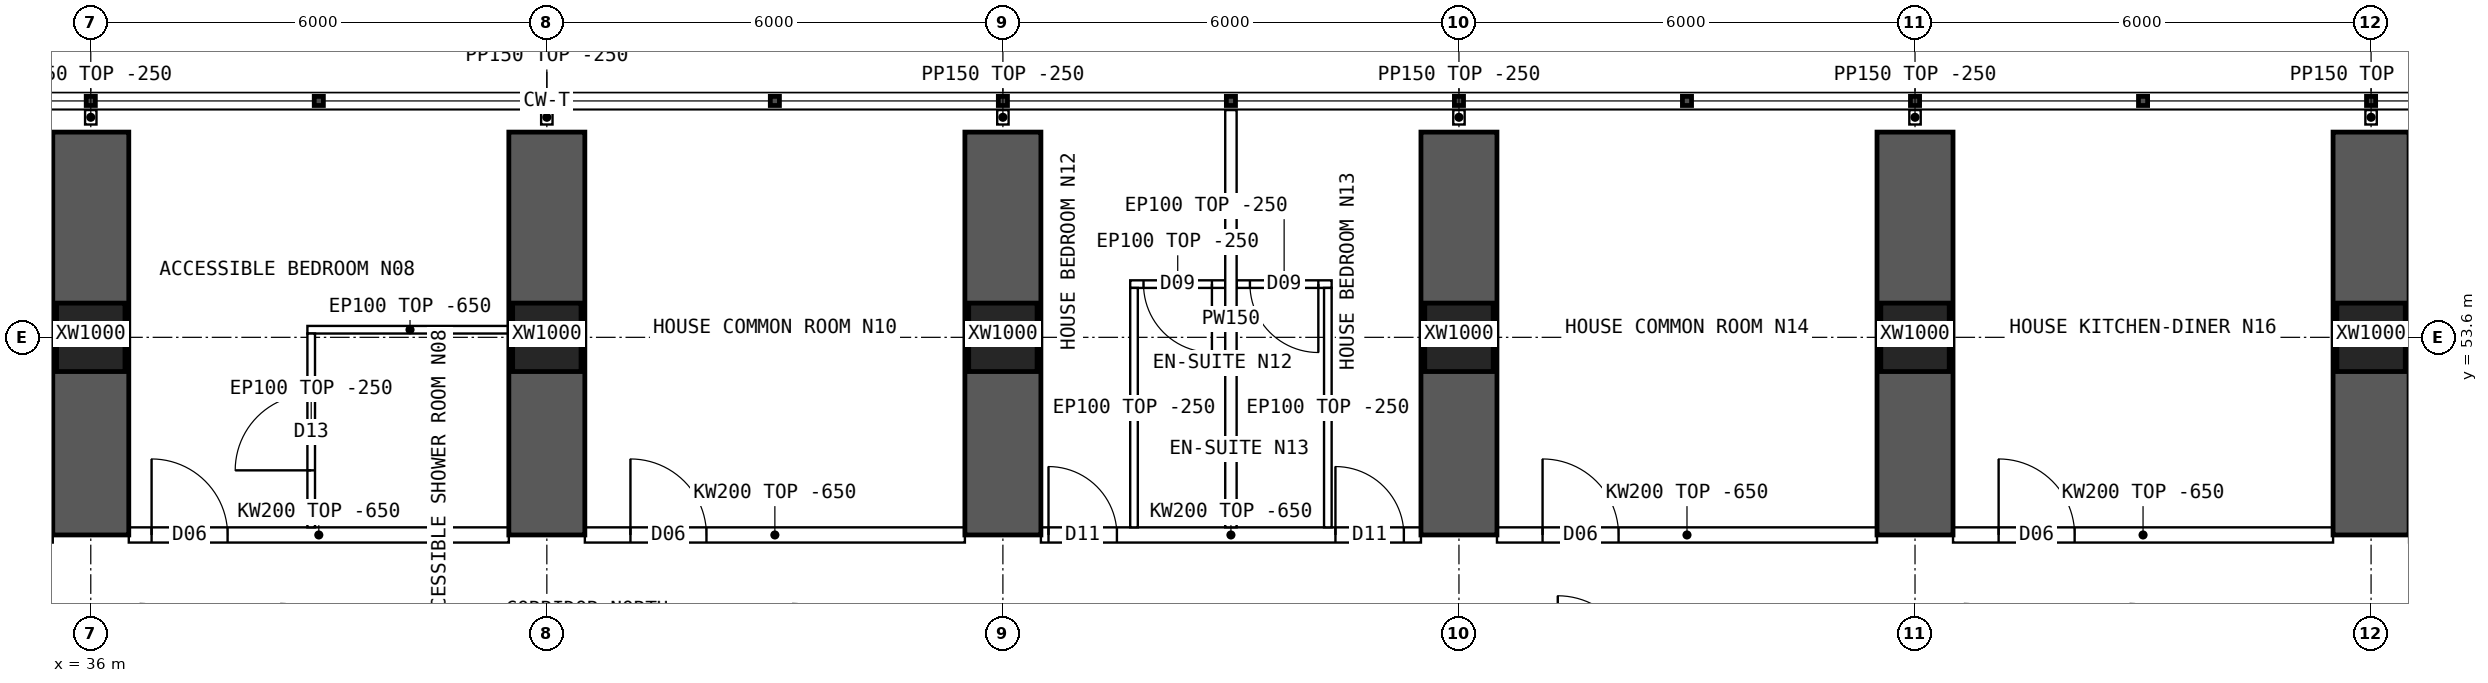
"""IFC4 building model, lengths in metres.
Left out: names, types, materials, properties, quantities, classifications, styles, units other than length and angle.
Written with IfcOpenShell. Run it as: python <this file> out.ifc"""

import sys

from ifc_helpers import new_model, si_unit, direction, frame, frame_2d, origin, origin_2d, place, context, subcontext, project, spatial, polyline, rectangle, hollow_rectangle, outline, extrude, element, fill, save


model = new_model("IFC4")
c1 = context("Model", 3, precision=1e-05, world=origin(), true_north=direction((0.0, 1.0)))
c2 = subcontext(c1, "Body", "Model", "MODEL_VIEW")
j1 = project(units=[si_unit("LENGTHUNIT", "METRE"), si_unit("PLANEANGLEUNIT", "RADIAN")], contexts=[c1])
p1 = place(None, origin())
s1 = spatial("IfcSite", under=j1, at=p1, CompositionType="ELEMENT")
p2 = place(p1, origin())
s2 = spatial("IfcBuilding", under=s1, at=p2, CompositionType="ELEMENT")
p3 = place(p2, frame((0.0, 0.0, 57.7)))
s3 = spatial("IfcBuildingStorey", under=s2, at=p3, CompositionType="ELEMENT", Elevation=57.7)
for number, where, z_axis, x_axis in (
    (1, (36.0, 53.6, 0.0), (0.0, 0.0, 1.0), (1.0, 0.0, 0.0)),
    (2, (42.0, 53.6, 0.0), (0.0, 0.0, 1.0), (1.0, 0.0, 0.0)),
    (3, (48.0, 53.6, 0.0), (0.0, 0.0, 1.0), (1.0, 0.0, 0.0)),
    (4, (54.0, 53.6, 0.0), (0.0, 0.0, 1.0), (1.0, 0.0, 0.0)),
    (5, (60.0, 53.6, 0.0), (0.0, 0.0, 1.0), (1.0, 0.0, 0.0)),
    (6, (66.0, 53.6, 0.0), (0.0, 0.0, 1.0), (1.0, 0.0, 0.0)),
):
    element("IfcColumn", number, at=place(p3, frame(where, z_axis=z_axis, x_axis=x_axis)), inside=s3, PredefinedType="COLUMN", context=c2, shape_type="SweptSolid", body=[
        extrude(hollow_rectangle(XDim=0.9, YDim=0.9, WallThickness=0.09, at=origin_2d()), origin(), (0.0, 0.0, 1.0), 3.75),
    ])
for number, where, z_axis, x_axis in (
    (7, (36.0, 51.0, 0.0), (0.0, 0.0, 1.0), (0.0, 1.0, 0.0)),
    (8, (42.0, 51.0, 0.0), (0.0, 0.0, 1.0), (0.0, 1.0, 0.0)),
    (9, (48.0, 51.0, 0.0), (0.0, 0.0, 1.0), (0.0, 1.0, 0.0)),
    (10, (54.0, 51.0, 0.0), (0.0, 0.0, 1.0), (0.0, 1.0, 0.0)),
    (11, (60.0, 51.0, 0.0), (0.0, 0.0, 1.0), (0.0, 1.0, 0.0)),
    (12, (66.0, 51.0, 0.0), (0.0, 0.0, 1.0), (0.0, 1.0, 0.0)),
):
    element("IfcWall", number, at=place(p3, frame(where, z_axis=z_axis, x_axis=x_axis)), inside=s3, PredefinedType="SHEAR", context=c2, shape_type="SweptSolid", body=[
        extrude(rectangle(XDim=5.3, YDim=1.0, at=frame_2d((2.65, 0.0))), origin(), (0.0, 0.0, 1.0), 3.75),
    ])
p4 = place(p3, frame((36.5, 51.0, 0.0), z_axis=(0.0, 0.0, 1.0), x_axis=(1.0, 0.0, 0.0)))
e13 = element("IfcWall", 13, at=p4, inside=s3, PredefinedType="SOLIDWALL", context=c2, shape_type="SweptSolid", body=[
    extrude(outline(polyline([(0.0, 0.0), (5.0, 0.0), (5.0, 3.1), (0.0, 3.1), (0.0, 0.0)])), frame((0.0, 0.1, 0.0), z_axis=(0.0, -1.0, 0.0), x_axis=(1.0, 0.0, 0.0)), (0.0, 0.0, 1.0), 0.2),
])
p5 = place(p4, frame((0.3, 0.0, 0.0)))
e14 = element("IfcOpeningElement", 14, at=p5, cuts=e13, PredefinedType="OPENING", context=c2, shape_type="SweptSolid", body=[
    extrude(rectangle(XDim=1.0, YDim=2.1, at=frame_2d((0.5, 1.05))), frame((0.0, 0.11, 0.0), z_axis=(0.0, -1.0, 0.0), x_axis=(1.0, 0.0, 0.0)), (0.0, 0.0, 1.0), 0.22),
])
p6 = place(p3, frame((42.5, 51.0, 0.0), z_axis=(0.0, 0.0, 1.0), x_axis=(1.0, 0.0, 0.0)))
e15 = element("IfcWall", 15, at=p6, inside=s3, PredefinedType="SOLIDWALL", context=c2, shape_type="SweptSolid", body=[
    extrude(outline(polyline([(0.0, 0.0), (5.0, 0.0), (5.0, 3.1), (0.0, 3.1), (0.0, 0.0)])), frame((0.0, 0.1, 0.0), z_axis=(0.0, -1.0, 0.0), x_axis=(1.0, 0.0, 0.0)), (0.0, 0.0, 1.0), 0.2),
])
p7 = place(p6, frame((0.6, 0.0, 0.0)))
e16 = element("IfcOpeningElement", 16, at=p7, cuts=e15, PredefinedType="OPENING", context=c2, shape_type="SweptSolid", body=[
    extrude(rectangle(XDim=1.0, YDim=2.1, at=frame_2d((0.5, 1.05))), frame((0.0, 0.11, 0.0), z_axis=(0.0, -1.0, 0.0), x_axis=(1.0, 0.0, 0.0)), (0.0, 0.0, 1.0), 0.22),
])
p8 = place(p3, frame((48.5, 51.0, 0.0), z_axis=(0.0, 0.0, 1.0), x_axis=(1.0, 0.0, 0.0)))
e17 = element("IfcWall", 17, at=p8, inside=s3, PredefinedType="SOLIDWALL", context=c2, shape_type="SweptSolid", body=[
    extrude(outline(polyline([(0.0, 0.0), (5.0, 0.0), (5.0, 3.1), (0.0, 3.1), (0.0, 0.0)])), frame((0.0, 0.1, 0.0), z_axis=(0.0, -1.0, 0.0), x_axis=(1.0, 0.0, 0.0)), (0.0, 0.0, 1.0), 0.2),
])
p9 = place(p8, frame((0.1, 0.0, 0.0)))
e18 = element("IfcOpeningElement", 18, at=p9, cuts=e17, PredefinedType="OPENING", context=c2, shape_type="SweptSolid", body=[
    extrude(rectangle(XDim=0.9, YDim=2.1, at=frame_2d((0.45, 1.05))), frame((0.0, 0.11, 0.0), z_axis=(0.0, -1.0, 0.0), x_axis=(1.0, 0.0, 0.0)), (0.0, 0.0, 1.0), 0.22),
])
p10 = place(p8, frame((3.875, 0.0, 0.0)))
e19 = element("IfcOpeningElement", 19, at=p10, cuts=e17, PredefinedType="OPENING", context=c2, shape_type="SweptSolid", body=[
    extrude(rectangle(XDim=0.9, YDim=2.1, at=frame_2d((0.45, 1.05))), frame((0.0, 0.11, 0.0), z_axis=(0.0, -1.0, 0.0), x_axis=(1.0, 0.0, 0.0)), (0.0, 0.0, 1.0), 0.22),
])
p11 = place(p3, frame((54.5, 51.0, 0.0), z_axis=(0.0, 0.0, 1.0), x_axis=(1.0, 0.0, 0.0)))
e20 = element("IfcWall", 20, at=p11, inside=s3, PredefinedType="SOLIDWALL", context=c2, shape_type="SweptSolid", body=[
    extrude(outline(polyline([(0.0, 0.0), (5.0, 0.0), (5.0, 3.1), (0.0, 3.1), (0.0, 0.0)])), frame((0.0, 0.1, 0.0), z_axis=(0.0, -1.0, 0.0), x_axis=(1.0, 0.0, 0.0)), (0.0, 0.0, 1.0), 0.2),
])
p12 = place(p11, frame((0.6, 0.0, 0.0)))
e21 = element("IfcOpeningElement", 21, at=p12, cuts=e20, PredefinedType="OPENING", context=c2, shape_type="SweptSolid", body=[
    extrude(rectangle(XDim=1.0, YDim=2.1, at=frame_2d((0.5, 1.05))), frame((0.0, 0.11, 0.0), z_axis=(0.0, -1.0, 0.0), x_axis=(1.0, 0.0, 0.0)), (0.0, 0.0, 1.0), 0.22),
])
p13 = place(p3, frame((60.5, 51.0, 0.0), z_axis=(0.0, 0.0, 1.0), x_axis=(1.0, 0.0, 0.0)))
e22 = element("IfcWall", 22, at=p13, inside=s3, PredefinedType="SOLIDWALL", context=c2, shape_type="SweptSolid", body=[
    extrude(outline(polyline([(0.0, 0.0), (5.0, 0.0), (5.0, 3.1), (0.0, 3.1), (0.0, 0.0)])), frame((0.0, 0.1, 0.0), z_axis=(0.0, -1.0, 0.0), x_axis=(1.0, 0.0, 0.0)), (0.0, 0.0, 1.0), 0.2),
])
p14 = place(p13, frame((0.6, 0.0, 0.0)))
e23 = element("IfcOpeningElement", 23, at=p14, cuts=e22, PredefinedType="OPENING", context=c2, shape_type="SweptSolid", body=[
    extrude(rectangle(XDim=1.0, YDim=2.1, at=frame_2d((0.5, 1.05))), frame((0.0, 0.11, 0.0), z_axis=(0.0, -1.0, 0.0), x_axis=(1.0, 0.0, 0.0)), (0.0, 0.0, 1.0), 0.22),
])
p15 = place(p3, frame((38.85, 53.7, 0.0), z_axis=(0.0, 0.0, 1.0), x_axis=(1.0, 0.0, 0.0)))
e24 = element("IfcWall", 24, at=p15, inside=s3, PredefinedType="PARTITIONING", context=c2, shape_type="SweptSolid", body=[
    extrude(outline(polyline([(0.0, 0.0), (2.7, 0.0), (2.7, 3.1), (0.0, 3.1), (0.0, 0.0)])), frame((0.0, 0.05, 0.0), z_axis=(0.0, -1.0, 0.0), x_axis=(1.0, 0.0, 0.0)), (0.0, 0.0, 1.0), 0.1),
])
p16 = place(p3, frame((38.9, 53.65, 0.0), z_axis=(0.0, 0.0, 1.0), x_axis=(0.0, -1.0, 0.0)))
e25 = element("IfcWall", 25, at=p16, inside=s3, PredefinedType="PARTITIONING", context=c2, shape_type="SweptSolid", body=[
    extrude(outline(polyline([(0.0, 0.0), (2.55, 0.0), (2.55, 3.1), (2.502, 3.1), (2.5, 3.5), (0.252, 3.5), (0.25, 3.1), (0.0, 3.1), (0.0, 0.0)])), frame((0.0, 0.05, 0.0), z_axis=(0.0, -1.0, 0.0), x_axis=(1.0, 0.0, 0.0)), (0.0, 0.0, 1.0), 0.1),
])
p17 = place(p16, frame((0.8, 0.0, 0.0)))
e26 = element("IfcOpeningElement", 26, at=p17, cuts=e25, PredefinedType="OPENING", context=c2, shape_type="SweptSolid", body=[
    extrude(rectangle(XDim=1.0, YDim=2.1, at=frame_2d((0.5, 1.05))), frame((0.0, 0.06, 0.0), z_axis=(0.0, -1.0, 0.0), x_axis=(1.0, 0.0, 0.0)), (0.0, 0.0, 1.0), 0.12),
])
p18 = place(p3, frame((51.0, 56.59, 0.0), z_axis=(0.0, 0.0, 1.0), x_axis=(0.0, -1.0, 0.0)))
e27 = element("IfcWall", 27, at=p18, inside=s3, PredefinedType="PARTITIONING", context=c2, shape_type="SweptSolid", body=[
    extrude(outline(polyline([(0.0, 0.0), (5.49, 0.0), (5.49, 3.1), (5.442, 3.1), (5.44, 3.5), (3.192, 3.5), (3.19, 3.1), (2.792, 3.1), (2.79, 3.5), (0.0, 3.5), (0.0, 0.0)])), frame((0.0, 0.075, 0.0), z_axis=(0.0, -1.0, 0.0), x_axis=(1.0, 0.0, 0.0)), (0.0, 0.0, 1.0), 0.15),
])
p19 = place(p3, frame((49.675, 54.3, 0.0), z_axis=(0.0, 0.0, 1.0), x_axis=(1.0, 0.0, 0.0)))
e28 = element("IfcWall", 28, at=p19, inside=s3, PredefinedType="PARTITIONING", context=c2, shape_type="SweptSolid", body=[
    extrude(rectangle(XDim=1.25, YDim=0.1, at=frame_2d((0.625, 0.0))), origin(), (0.0, 0.0, 1.0), 3.5),
])
p20 = place(p19, frame((0.175, 0.0, 0.0)))
e29 = element("IfcOpeningElement", 29, at=p20, cuts=e28, PredefinedType="OPENING", context=c2, shape_type="SweptSolid", body=[
    extrude(rectangle(XDim=0.9, YDim=2.1, at=frame_2d((0.45, 1.05))), frame((0.0, 0.06, 0.0), z_axis=(0.0, -1.0, 0.0), x_axis=(1.0, 0.0, 0.0)), (0.0, 0.0, 1.0), 0.12),
])
p21 = place(p3, frame((49.725, 54.25, 0.0), z_axis=(0.0, 0.0, 1.0), x_axis=(0.0, -1.0, 0.0)))
e30 = element("IfcWall", 30, at=p21, inside=s3, PredefinedType="PARTITIONING", context=c2, shape_type="SweptSolid", body=[
    extrude(outline(polyline([(0.0, 0.0), (3.15, 0.0), (3.15, 3.1), (3.102, 3.1), (3.1, 3.5), (0.852, 3.5), (0.85, 3.1), (0.452, 3.1), (0.45, 3.5), (0.0, 3.5), (0.0, 0.0)])), frame((0.0, 0.05, 0.0), z_axis=(0.0, -1.0, 0.0), x_axis=(1.0, 0.0, 0.0)), (0.0, 0.0, 1.0), 0.1),
])
p22 = place(p3, frame((51.075, 54.3, 0.0), z_axis=(0.0, 0.0, 1.0), x_axis=(1.0, 0.0, 0.0)))
e31 = element("IfcWall", 31, at=p22, inside=s3, PredefinedType="PARTITIONING", context=c2, shape_type="SweptSolid", body=[
    extrude(rectangle(XDim=1.25, YDim=0.1, at=frame_2d((0.625, 0.0))), origin(), (0.0, 0.0, 1.0), 3.5),
])
p23 = place(p22, frame((0.175, 0.0, 0.0)))
e32 = element("IfcOpeningElement", 32, at=p23, cuts=e31, PredefinedType="OPENING", context=c2, shape_type="SweptSolid", body=[
    extrude(rectangle(XDim=0.9, YDim=2.1, at=frame_2d((0.45, 1.05))), frame((0.0, 0.06, 0.0), z_axis=(0.0, -1.0, 0.0), x_axis=(1.0, 0.0, 0.0)), (0.0, 0.0, 1.0), 0.12),
])
p24 = place(p3, frame((52.275, 54.25, 0.0), z_axis=(0.0, 0.0, 1.0), x_axis=(0.0, -1.0, 0.0)))
e33 = element("IfcWall", 33, at=p24, inside=s3, PredefinedType="PARTITIONING", context=c2, shape_type="SweptSolid", body=[
    extrude(outline(polyline([(0.0, 0.0), (3.15, 0.0), (3.15, 3.1), (3.102, 3.1), (3.1, 3.5), (0.852, 3.5), (0.85, 3.1), (0.452, 3.1), (0.45, 3.5), (0.0, 3.5), (0.0, 0.0)])), frame((0.0, 0.05, 0.0), z_axis=(0.0, -1.0, 0.0), x_axis=(1.0, 0.0, 0.0)), (0.0, 0.0, 1.0), 0.1),
])
for number, where, z_axis, x_axis in (
    (34, (36.0, 56.4, 0.0), (0.0, 0.0, 1.0), (0.0, 1.0, 0.0)),
    (35, (42.0, 56.4, 0.0), (0.0, 0.0, 1.0), (0.0, 1.0, 0.0)),
    (36, (48.0, 56.4, 0.0), (0.0, 0.0, 1.0), (0.0, 1.0, 0.0)),
    (37, (54.0, 56.4, 0.0), (0.0, 0.0, 1.0), (0.0, 1.0, 0.0)),
    (38, (60.0, 56.4, 0.0), (0.0, 0.0, 1.0), (0.0, 1.0, 0.0)),
    (39, (66.0, 56.4, 0.0), (0.0, 0.0, 1.0), (0.0, 1.0, 0.0)),
):
    element("IfcWall", number, at=place(p3, frame(where, z_axis=z_axis, x_axis=x_axis)), inside=s3, PredefinedType="PARTITIONING", context=c2, shape_type="SweptSolid", body=[
        extrude(rectangle(XDim=0.19, YDim=0.15, at=frame_2d((0.095, 0.0))), origin(), (0.0, 0.0, 1.0), 3.5),
    ])
p25 = place(p17, origin())
e40 = element("IfcDoor", 40, at=p25, inside=s3, OperationType="SINGLE_SWING_RIGHT", PredefinedType="DOOR", context=c2, shape_type="SweptSolid", body=[
    extrude(rectangle(XDim=1.0, YDim=2.1, at=frame_2d((0.5, 1.05))), frame((0.0, 0.025, 0.0), z_axis=(0.0, -1.0, 0.0), x_axis=(1.0, 0.0, 0.0)), (0.0, 0.0, 1.0), 0.05),
])
fill(e26, e40)
p26 = place(p5, origin())
e41 = element("IfcDoor", 41, at=p26, inside=s3, OperationType="SINGLE_SWING_LEFT", PredefinedType="DOOR", context=c2, shape_type="SweptSolid", body=[
    extrude(rectangle(XDim=1.0, YDim=2.1, at=frame_2d((0.5, 1.05))), frame((0.0, 0.025, 0.0), z_axis=(0.0, -1.0, 0.0), x_axis=(1.0, 0.0, 0.0)), (0.0, 0.0, 1.0), 0.05),
])
fill(e14, e41)
p27 = place(p7, origin())
e42 = element("IfcDoor", 42, at=p27, inside=s3, OperationType="SINGLE_SWING_LEFT", PredefinedType="DOOR", context=c2, shape_type="SweptSolid", body=[
    extrude(rectangle(XDim=1.0, YDim=2.1, at=frame_2d((0.5, 1.05))), frame((0.0, 0.025, 0.0), z_axis=(0.0, -1.0, 0.0), x_axis=(1.0, 0.0, 0.0)), (0.0, 0.0, 1.0), 0.05),
])
fill(e16, e42)
p28 = place(p20, origin())
e43 = element("IfcDoor", 43, at=p28, inside=s3, OperationType="SINGLE_SWING_RIGHT", PredefinedType="DOOR", context=c2, shape_type="SweptSolid", body=[
    extrude(rectangle(XDim=0.9, YDim=2.1, at=frame_2d((0.45, 1.05))), frame((0.0, 0.025, 0.0), z_axis=(0.0, -1.0, 0.0), x_axis=(1.0, 0.0, 0.0)), (0.0, 0.0, 1.0), 0.05),
])
fill(e29, e43)
p29 = place(p9, origin())
e44 = element("IfcDoor", 44, at=p29, inside=s3, OperationType="SINGLE_SWING_LEFT", PredefinedType="DOOR", context=c2, shape_type="SweptSolid", body=[
    extrude(rectangle(XDim=0.9, YDim=2.1, at=frame_2d((0.45, 1.05))), frame((0.0, 0.025, 0.0), z_axis=(0.0, -1.0, 0.0), x_axis=(1.0, 0.0, 0.0)), (0.0, 0.0, 1.0), 0.05),
])
fill(e18, e44)
p30 = place(p23, origin())
e45 = element("IfcDoor", 45, at=p30, inside=s3, OperationType="SINGLE_SWING_RIGHT", PredefinedType="DOOR", context=c2, shape_type="SweptSolid", body=[
    extrude(rectangle(XDim=0.9, YDim=2.1, at=frame_2d((0.45, 1.05))), frame((0.0, 0.025, 0.0), z_axis=(0.0, -1.0, 0.0), x_axis=(1.0, 0.0, 0.0)), (0.0, 0.0, 1.0), 0.05),
])
fill(e32, e45)
p31 = place(p10, origin())
e46 = element("IfcDoor", 46, at=p31, inside=s3, OperationType="SINGLE_SWING_LEFT", PredefinedType="DOOR", context=c2, shape_type="SweptSolid", body=[
    extrude(rectangle(XDim=0.9, YDim=2.1, at=frame_2d((0.45, 1.05))), frame((0.0, 0.025, 0.0), z_axis=(0.0, -1.0, 0.0), x_axis=(1.0, 0.0, 0.0)), (0.0, 0.0, 1.0), 0.05),
])
fill(e19, e46)
p32 = place(p12, origin())
e47 = element("IfcDoor", 47, at=p32, inside=s3, OperationType="SINGLE_SWING_LEFT", PredefinedType="DOOR", context=c2, shape_type="SweptSolid", body=[
    extrude(rectangle(XDim=1.0, YDim=2.1, at=frame_2d((0.5, 1.05))), frame((0.0, 0.025, 0.0), z_axis=(0.0, -1.0, 0.0), x_axis=(1.0, 0.0, 0.0)), (0.0, 0.0, 1.0), 0.05),
])
fill(e21, e47)
p33 = place(p14, origin())
e48 = element("IfcDoor", 48, at=p33, inside=s3, OperationType="SINGLE_SWING_LEFT", PredefinedType="DOOR", context=c2, shape_type="SweptSolid", body=[
    extrude(rectangle(XDim=1.0, YDim=2.1, at=frame_2d((0.5, 1.05))), frame((0.0, 0.025, 0.0), z_axis=(0.0, -1.0, 0.0), x_axis=(1.0, 0.0, 0.0)), (0.0, 0.0, 1.0), 0.05),
])
fill(e23, e48)
save(model, sys.argv[1])
